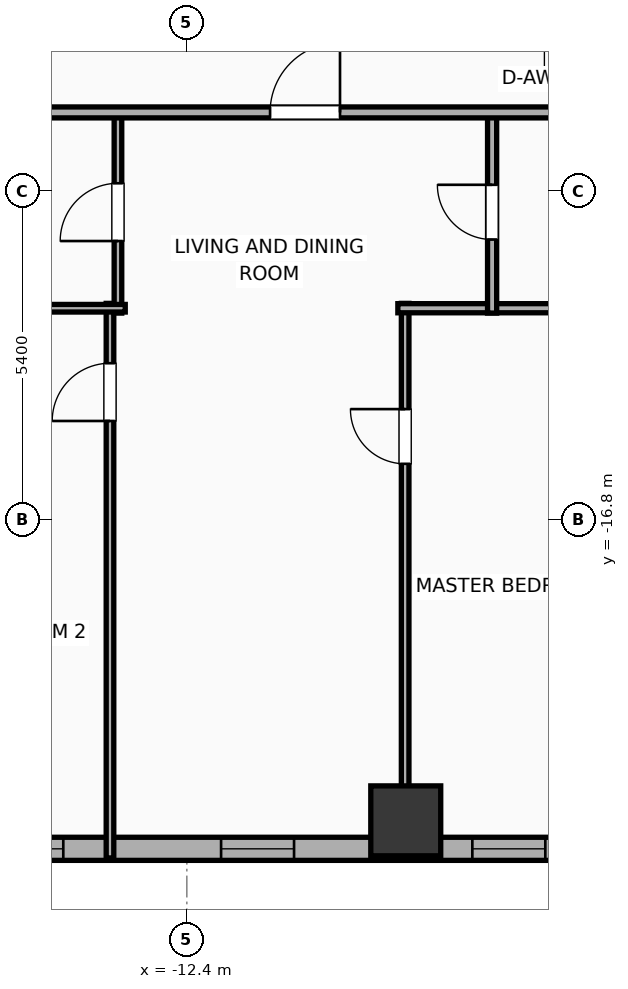
"""IFC4 building model, lengths in metres.
Left out: names, types, materials, properties, quantities, classifications, styles, units other than length and angle.
Written with IfcOpenShell. Run it as: python <this file> out.ifc"""

import sys

from ifc_helpers import new_model, si_unit, direction, frame, frame_2d, origin, origin_2d, place, context, subcontext, project, spatial, rectangle, hollow_rectangle, extrude, element, fill, save


model = new_model("IFC4")
c1 = context("Model", 3, precision=1e-05, world=origin(), true_north=direction((0.0, 1.0)))
c2 = subcontext(c1, "Body", "Model", "MODEL_VIEW")
j1 = project(units=[si_unit("LENGTHUNIT", "METRE"), si_unit("PLANEANGLEUNIT", "RADIAN")], contexts=[c1])
p1 = place(None, origin())
s1 = spatial("IfcSite", under=j1, at=p1, CompositionType="ELEMENT")
p2 = place(p1, origin())
s2 = spatial("IfcBuilding", under=s1, at=p2, CompositionType="ELEMENT")
p3 = place(p2, frame((0.0, 0.0, 41.6)))
s3 = spatial("IfcBuildingStorey", under=s2, at=p3, CompositionType="ELEMENT", Elevation=41.6)
p4 = place(p3, frame((-8.8, -21.75, 0.0), z_axis=(0.0, 0.0, 1.0), x_axis=(1.0, 0.0, 0.0)))
e1 = element("IfcColumn", 1, at=p4, inside=s3, PredefinedType="COLUMN", context=c2, shape_type="SweptSolid", body=[
    extrude(hollow_rectangle(XDim=1.15, YDim=1.15, WallThickness=0.04, at=origin_2d()), origin(), (0.0, 0.0, 1.0), 3.9),
])
p5 = place(p3, frame((22.381, -22.21, 0.0), z_axis=(0.0, 0.0, 1.0), x_axis=(-1.0, 0.0, 0.0)))
e2 = element("IfcWall", 2, at=p5, inside=s3, PredefinedType="ELEMENTEDWALL", context=c2, shape_type="SweptSolid", body=[
    extrude(rectangle(XDim=51.963, YDim=0.38, at=frame_2d((25.981, 0.0))), origin(), (0.0, 0.0, 1.0), 3.65),
])
p6 = place(p5, frame((42.952, 0.0, 0.75)))
e3 = element("IfcOpeningElement", 3, at=p6, cuts=e2, PredefinedType="OPENING", context=c2, shape_type="SweptSolid", body=[
    extrude(rectangle(XDim=2.4, YDim=2.1, at=frame_2d((1.2, 1.05))), frame((0.0, 0.2, 0.0), z_axis=(0.0, -1.0, 0.0), x_axis=(1.0, 0.0, 0.0)), (0.0, 0.0, 1.0), 0.4),
])
p7 = place(p5, frame((49.847, 0.0, 0.75)))
e4 = element("IfcOpeningElement", 4, at=p7, cuts=e2, PredefinedType="OPENING", context=c2, shape_type="SweptSolid", body=[
    extrude(rectangle(XDim=1.2, YDim=2.05, at=frame_2d((0.6, 1.025))), frame((0.0, 0.2, 0.0), z_axis=(0.0, -1.0, 0.0), x_axis=(1.0, 0.0, 0.0)), (0.0, 0.0, 1.0), 0.4),
])
p8 = place(p5, frame((47.445, 0.0, 0.75)))
e5 = element("IfcOpeningElement", 5, at=p8, cuts=e2, PredefinedType="OPENING", context=c2, shape_type="SweptSolid", body=[
    extrude(rectangle(XDim=1.2, YDim=2.05, at=frame_2d((0.6, 1.025))), frame((0.0, 0.2, 0.0), z_axis=(0.0, -1.0, 0.0), x_axis=(1.0, 0.0, 0.0)), (0.0, 0.0, 1.0), 0.4),
])
p9 = place(p5, frame((39.526, 0.0, 0.75)))
e6 = element("IfcOpeningElement", 6, at=p9, cuts=e2, PredefinedType="OPENING", context=c2, shape_type="SweptSolid", body=[
    extrude(rectangle(XDim=1.2, YDim=2.05, at=frame_2d((0.6, 1.025))), frame((0.0, 0.2, 0.0), z_axis=(0.0, -1.0, 0.0), x_axis=(1.0, 0.0, 0.0)), (0.0, 0.0, 1.0), 0.4),
])
p10 = place(p5, frame((33.018, 0.0, 0.75)))
e7 = element("IfcOpeningElement", 7, at=p10, cuts=e2, PredefinedType="OPENING", context=c2, shape_type="SweptSolid", body=[
    extrude(rectangle(XDim=1.2, YDim=2.05, at=frame_2d((0.6, 1.025))), frame((0.0, 0.2, 0.0), z_axis=(0.0, -1.0, 0.0), x_axis=(1.0, 0.0, 0.0)), (0.0, 0.0, 1.0), 0.4),
])
p11 = place(p5, frame((36.813, 0.0, 0.75)))
e8 = element("IfcOpeningElement", 8, at=p11, cuts=e2, PredefinedType="OPENING", context=c2, shape_type="SweptSolid", body=[
    extrude(rectangle(XDim=1.2, YDim=2.05, at=frame_2d((0.6, 1.025))), frame((0.0, 0.2, 0.0), z_axis=(0.0, -1.0, 0.0), x_axis=(1.0, 0.0, 0.0)), (0.0, 0.0, 1.0), 0.4),
])
p12 = place(p5, frame((28.886, 0.0, 0.75)))
e9 = element("IfcOpeningElement", 9, at=p12, cuts=e2, PredefinedType="OPENING", context=c2, shape_type="SweptSolid", body=[
    extrude(rectangle(XDim=1.2, YDim=2.05, at=frame_2d((0.6, 1.025))), frame((0.0, 0.2, 0.0), z_axis=(0.0, -1.0, 0.0), x_axis=(1.0, 0.0, 0.0)), (0.0, 0.0, 1.0), 0.4),
])
p13 = place(p5, frame((23.306, 0.0, 0.75)))
e10 = element("IfcOpeningElement", 10, at=p13, cuts=e2, PredefinedType="OPENING", context=c2, shape_type="SweptSolid", body=[
    extrude(rectangle(XDim=1.2, YDim=2.05, at=frame_2d((0.6, 1.025))), frame((0.0, 0.2, 0.0), z_axis=(0.0, -1.0, 0.0), x_axis=(1.0, 0.0, 0.0)), (0.0, 0.0, 1.0), 0.4),
])
p14 = place(p5, frame((26.056, 0.0, 0.75)))
e11 = element("IfcOpeningElement", 11, at=p14, cuts=e2, PredefinedType="OPENING", context=c2, shape_type="SweptSolid", body=[
    extrude(rectangle(XDim=1.2, YDim=2.05, at=frame_2d((0.6, 1.025))), frame((0.0, 0.2, 0.0), z_axis=(0.0, -1.0, 0.0), x_axis=(1.0, 0.0, 0.0)), (0.0, 0.0, 1.0), 0.4),
])
p15 = place(p5, frame((18.811, 0.0, 0.75)))
e12 = element("IfcOpeningElement", 12, at=p15, cuts=e2, PredefinedType="OPENING", context=c2, shape_type="SweptSolid", body=[
    extrude(rectangle(XDim=1.2, YDim=2.05, at=frame_2d((0.6, 1.025))), frame((0.0, 0.2, 0.0), z_axis=(0.0, -1.0, 0.0), x_axis=(1.0, 0.0, 0.0)), (0.0, 0.0, 1.0), 0.4),
])
p16 = place(p5, frame((14.602, 0.0, 0.75)))
e13 = element("IfcOpeningElement", 13, at=p16, cuts=e2, PredefinedType="OPENING", context=c2, shape_type="SweptSolid", body=[
    extrude(rectangle(XDim=1.2, YDim=2.05, at=frame_2d((0.6, 1.025))), frame((0.0, 0.2, 0.0), z_axis=(0.0, -1.0, 0.0), x_axis=(1.0, 0.0, 0.0)), (0.0, 0.0, 1.0), 0.4),
])
p17 = place(p5, frame((11.852, 0.0, 0.75)))
e14 = element("IfcOpeningElement", 14, at=p17, cuts=e2, PredefinedType="OPENING", context=c2, shape_type="SweptSolid", body=[
    extrude(rectangle(XDim=1.2, YDim=2.05, at=frame_2d((0.6, 1.025))), frame((0.0, 0.2, 0.0), z_axis=(0.0, -1.0, 0.0), x_axis=(1.0, 0.0, 0.0)), (0.0, 0.0, 1.0), 0.4),
])
p18 = place(p5, frame((8.316, 0.0, 0.75)))
e15 = element("IfcOpeningElement", 15, at=p18, cuts=e2, PredefinedType="OPENING", context=c2, shape_type="SweptSolid", body=[
    extrude(rectangle(XDim=1.2, YDim=2.05, at=frame_2d((0.6, 1.025))), frame((0.0, 0.2, 0.0), z_axis=(0.0, -1.0, 0.0), x_axis=(1.0, 0.0, 0.0)), (0.0, 0.0, 1.0), 0.4),
])
p19 = place(p5, frame((6.286, 0.0, 0.75)))
e16 = element("IfcOpeningElement", 16, at=p19, cuts=e2, PredefinedType="OPENING", context=c2, shape_type="SweptSolid", body=[
    extrude(rectangle(XDim=1.2, YDim=2.05, at=frame_2d((0.6, 1.025))), frame((0.0, 0.2, 0.0), z_axis=(0.0, -1.0, 0.0), x_axis=(1.0, 0.0, 0.0)), (0.0, 0.0, 1.0), 0.4),
])
p20 = place(p5, frame((3.737, 0.0, 0.75)))
e17 = element("IfcOpeningElement", 17, at=p20, cuts=e2, PredefinedType="OPENING", context=c2, shape_type="SweptSolid", body=[
    extrude(rectangle(XDim=1.2, YDim=2.05, at=frame_2d((0.6, 1.025))), frame((0.0, 0.2, 0.0), z_axis=(0.0, -1.0, 0.0), x_axis=(1.0, 0.0, 0.0)), (0.0, 0.0, 1.0), 0.4),
])
p21 = place(p5, frame((1.291, 0.0, 0.75)))
e18 = element("IfcOpeningElement", 18, at=p21, cuts=e2, PredefinedType="OPENING", context=c2, shape_type="SweptSolid", body=[
    extrude(rectangle(XDim=1.2, YDim=2.05, at=frame_2d((0.6, 1.025))), frame((0.0, 0.2, 0.0), z_axis=(0.0, -1.0, 0.0), x_axis=(1.0, 0.0, 0.0)), (0.0, 0.0, 1.0), 0.4),
])
p22 = place(p3, frame((-13.664, -22.36, 0.0), z_axis=(0.0, 0.0, 1.0), x_axis=(0.0, 1.0, 0.0)))
e19 = element("IfcWall", 19, at=p22, inside=s3, PredefinedType="PARTITIONING", context=c2, shape_type="SweptSolid", body=[
    extrude(rectangle(XDim=9.12, YDim=0.125, at=frame_2d((4.56, 0.0))), origin(), (0.0, 0.0, 1.0), 3.65),
])
p23 = place(p22, frame((7.186, 0.0, 0.0)))
e20 = element("IfcOpeningElement", 20, at=p23, cuts=e19, PredefinedType="OPENING", context=c2, shape_type="SweptSolid", body=[
    extrude(rectangle(XDim=0.95, YDim=2.05, at=frame_2d((0.475, 1.025))), frame((0.0, 0.073, 0.0), z_axis=(0.0, -1.0, 0.0), x_axis=(1.0, 0.0, 0.0)), (0.0, 0.0, 1.0), 0.145),
])
p24 = place(p3, frame((-8.81, -22.36, 0.0), z_axis=(0.0, 0.0, 1.0), x_axis=(0.0, 1.0, 0.0)))
e21 = element("IfcWall", 21, at=p24, inside=s3, PredefinedType="PARTITIONING", context=c2, shape_type="SweptSolid", body=[
    extrude(rectangle(XDim=9.12, YDim=0.125, at=frame_2d((4.56, 0.0))), origin(), (0.0, 0.0, 1.0), 2.94),
])
p25 = place(p24, frame((6.481, 0.0, 0.0)))
e22 = element("IfcOpeningElement", 22, at=p25, cuts=e21, PredefinedType="OPENING", context=c2, shape_type="SweptSolid", body=[
    extrude(rectangle(XDim=0.9, YDim=2.05, at=frame_2d((0.45, 1.025))), frame((0.0, 0.073, 0.0), z_axis=(0.0, -1.0, 0.0), x_axis=(1.0, 0.0, 0.0)), (0.0, 0.0, 1.0), 0.145),
])
p26 = place(p3, frame((-8.93, -13.32, 0.0), z_axis=(0.0, 0.0, 1.0), x_axis=(1.0, 0.0, 0.0)))
e23 = element("IfcWall", 23, at=p26, inside=s3, PredefinedType="PLUMBINGWALL", context=c2, shape_type="SweptSolid", body=[
    extrude(rectangle(XDim=3.79, YDim=0.15, at=frame_2d((1.895, 0.0))), origin(), (0.0, 0.0, 1.0), 3.65),
])
p27 = place(p3, frame((-13.533, -13.4, 0.0), z_axis=(0.0, 0.0, 1.0), x_axis=(0.0, 1.0, 0.0)))
e24 = element("IfcWall", 24, at=p27, inside=s3, PredefinedType="PARTITIONING", context=c2, shape_type="SweptSolid", body=[
    extrude(rectangle(XDim=3.32, YDim=0.125, at=frame_2d((1.66, 0.0))), origin(), (0.0, 0.0, 1.0), 3.65),
])
p28 = place(p27, frame((1.185, 0.0, 0.0)))
e25 = element("IfcOpeningElement", 25, at=p28, cuts=e24, PredefinedType="OPENING", context=c2, shape_type="SweptSolid", body=[
    extrude(rectangle(XDim=0.95, YDim=2.05, at=frame_2d((0.475, 1.025))), frame((0.0, 0.073, 0.0), z_axis=(0.0, -1.0, 0.0), x_axis=(1.0, 0.0, 0.0)), (0.0, 0.0, 1.0), 0.145),
])
p29 = place(p3, frame((-16.475, -13.32, 0.0), z_axis=(0.0, 0.0, 1.0), x_axis=(1.0, 0.0, 0.0)))
e26 = element("IfcWall", 26, at=p29, inside=s3, PredefinedType="PARTITIONING", context=c2, shape_type="SweptSolid", body=[
    extrude(rectangle(XDim=3.062, YDim=0.125, at=frame_2d((1.531, 0.0))), origin(), (0.0, 0.0, 1.0), 3.65),
])
p30 = place(p3, frame((-7.38, -13.4, 0.0), z_axis=(0.0, 0.0, 1.0), x_axis=(0.0, 1.0, 0.0)))
e27 = element("IfcWall", 27, at=p30, inside=s3, PredefinedType="PLUMBINGWALL", context=c2, shape_type="SweptSolid", body=[
    extrude(rectangle(XDim=3.32, YDim=0.15, at=frame_2d((1.66, 0.0))), origin(), (0.0, 0.0, 1.0), 3.65),
])
p31 = place(p30, frame((1.21, 0.0, 0.0)))
e28 = element("IfcOpeningElement", 28, at=p31, cuts=e27, PredefinedType="OPENING", context=c2, shape_type="SweptSolid", body=[
    extrude(rectangle(XDim=0.9, YDim=2.05, at=frame_2d((0.45, 1.025))), frame((0.0, 0.085, 0.0), z_axis=(0.0, -1.0, 0.0), x_axis=(1.0, 0.0, 0.0)), (0.0, 0.0, 1.0), 0.17),
])
p32 = place(p3, frame((-33.41, -10.1, 0.0), z_axis=(0.0, 0.0, 1.0), x_axis=(1.0, 0.0, 0.0)))
e29 = element("IfcWall", 29, at=p32, inside=s3, PredefinedType="PARTITIONING", context=c2, shape_type="SweptSolid", body=[
    extrude(rectangle(XDim=59.62, YDim=0.18, at=frame_2d((29.81, 0.0))), origin(), (0.0, 0.0, 1.0), 3.65),
])
p33 = place(p32, frame((2.746, 0.0, 0.0)))
e30 = element("IfcOpeningElement", 30, at=p33, cuts=e29, PredefinedType="OPENING", context=c2, shape_type="SweptSolid", body=[
    extrude(rectangle(XDim=0.9, YDim=2.05, at=frame_2d((0.45, 1.025))), frame((0.0, 0.1, 0.0), z_axis=(0.0, -1.0, 0.0), x_axis=(1.0, 0.0, 0.0)), (0.0, 0.0, 1.0), 0.2),
])
p34 = place(p32, frame((11.552, 0.0, 0.0)))
e31 = element("IfcOpeningElement", 31, at=p34, cuts=e29, PredefinedType="OPENING", context=c2, shape_type="SweptSolid", body=[
    extrude(rectangle(XDim=1.15, YDim=2.05, at=frame_2d((0.575, 1.025))), frame((0.0, 0.1, 0.0), z_axis=(0.0, -1.0, 0.0), x_axis=(1.0, 0.0, 0.0)), (0.0, 0.0, 1.0), 0.2),
])
p35 = place(p32, frame((22.379, 0.0, 0.0)))
e32 = element("IfcOpeningElement", 32, at=p35, cuts=e29, PredefinedType="OPENING", context=c2, shape_type="SweptSolid", body=[
    extrude(rectangle(XDim=1.15, YDim=2.05, at=frame_2d((0.575, 1.025))), frame((0.0, 0.1, 0.0), z_axis=(0.0, -1.0, 0.0), x_axis=(1.0, 0.0, 0.0)), (0.0, 0.0, 1.0), 0.2),
])
p36 = place(p32, frame((31.28, 0.0, 0.0)))
e33 = element("IfcOpeningElement", 33, at=p36, cuts=e29, PredefinedType="OPENING", context=c2, shape_type="SweptSolid", body=[
    extrude(rectangle(XDim=1.15, YDim=2.05, at=frame_2d((0.575, 1.025))), frame((0.0, 0.1, 0.0), z_axis=(0.0, -1.0, 0.0), x_axis=(1.0, 0.0, 0.0)), (0.0, 0.0, 1.0), 0.2),
])
p37 = place(p32, frame((36.02, 0.0, 0.0)))
e34 = element("IfcOpeningElement", 34, at=p37, cuts=e29, PredefinedType="OPENING", context=c2, shape_type="SweptSolid", body=[
    extrude(rectangle(XDim=0.9, YDim=2.05, at=frame_2d((0.45, 1.025))), frame((0.0, 0.1, 0.0), z_axis=(0.0, -1.0, 0.0), x_axis=(1.0, 0.0, 0.0)), (0.0, 0.0, 1.0), 0.2),
])
p38 = place(p32, frame((40.044, 0.0, 0.0)))
e35 = element("IfcOpeningElement", 35, at=p38, cuts=e29, PredefinedType="OPENING", context=c2, shape_type="SweptSolid", body=[
    extrude(rectangle(XDim=1.15, YDim=2.05, at=frame_2d((0.575, 1.025))), frame((0.0, 0.1, 0.0), z_axis=(0.0, -1.0, 0.0), x_axis=(1.0, 0.0, 0.0)), (0.0, 0.0, 1.0), 0.2),
])
p39 = place(p32, frame((45.613, 0.0, 0.0)))
e36 = element("IfcOpeningElement", 36, at=p39, cuts=e29, PredefinedType="OPENING", context=c2, shape_type="SweptSolid", body=[
    extrude(rectangle(XDim=1.15, YDim=2.05, at=frame_2d((0.575, 1.025))), frame((0.0, 0.1, 0.0), z_axis=(0.0, -1.0, 0.0), x_axis=(1.0, 0.0, 0.0)), (0.0, 0.0, 1.0), 0.2),
])
p40 = place(p32, frame((54.174, 0.0, 0.0)))
e37 = element("IfcOpeningElement", 37, at=p40, cuts=e29, PredefinedType="OPENING", context=c2, shape_type="SweptSolid", body=[
    extrude(rectangle(XDim=1.15, YDim=2.05, at=frame_2d((0.575, 1.025))), frame((0.0, 0.1, 0.0), z_axis=(0.0, -1.0, 0.0), x_axis=(1.0, 0.0, 0.0)), (0.0, 0.0, 1.0), 0.2),
])
p41 = place(p10, origin())
e38 = element("IfcWindow", 38, at=p41, inside=s3, PartitioningType="SINGLE_PANEL", PredefinedType="WINDOW", context=c2, shape_type="SweptSolid", body=[
    extrude(rectangle(XDim=1.2, YDim=2.05, at=frame_2d((0.6, 1.025))), frame((0.0, 0.03, 0.0), z_axis=(0.0, -1.0, 0.0), x_axis=(1.0, 0.0, 0.0)), (0.0, 0.0, 1.0), 0.06),
])
fill(e7, e38)
p42 = place(p11, origin())
e39 = element("IfcWindow", 39, at=p42, inside=s3, PartitioningType="SINGLE_PANEL", PredefinedType="WINDOW", context=c2, shape_type="SweptSolid", body=[
    extrude(rectangle(XDim=1.2, YDim=2.05, at=frame_2d((0.6, 1.025))), frame((0.0, 0.03, 0.0), z_axis=(0.0, -1.0, 0.0), x_axis=(1.0, 0.0, 0.0)), (0.0, 0.0, 1.0), 0.06),
])
fill(e8, e39)
p43 = place(p12, origin())
e40 = element("IfcWindow", 40, at=p43, inside=s3, PartitioningType="SINGLE_PANEL", PredefinedType="WINDOW", context=c2, shape_type="SweptSolid", body=[
    extrude(rectangle(XDim=1.2, YDim=2.05, at=frame_2d((0.6, 1.025))), frame((0.0, 0.03, 0.0), z_axis=(0.0, -1.0, 0.0), x_axis=(1.0, 0.0, 0.0)), (0.0, 0.0, 1.0), 0.06),
])
fill(e9, e40)
p44 = place(p23, origin())
e41 = element("IfcDoor", 41, at=p44, inside=s3, OperationType="SINGLE_SWING_LEFT", PredefinedType="DOOR", context=c2, shape_type="SweptSolid", body=[
    extrude(rectangle(XDim=0.95, YDim=2.05, at=frame_2d((0.475, 1.025))), frame((0.0, 0.025, 0.0), z_axis=(0.0, -1.0, 0.0), x_axis=(1.0, 0.0, 0.0)), (0.0, 0.0, 1.0), 0.05),
])
fill(e20, e41)
p45 = place(p25, origin())
e42 = element("IfcDoor", 42, at=p45, inside=s3, OperationType="SINGLE_SWING_RIGHT", PredefinedType="DOOR", context=c2, shape_type="SweptSolid", body=[
    extrude(rectangle(XDim=0.9, YDim=2.05, at=frame_2d((0.45, 1.025))), frame((0.0, 0.025, 0.0), z_axis=(0.0, -1.0, 0.0), x_axis=(1.0, 0.0, 0.0)), (0.0, 0.0, 1.0), 0.05),
])
fill(e22, e42)
p46 = place(p28, origin())
e43 = element("IfcDoor", 43, at=p46, inside=s3, OperationType="SINGLE_SWING_LEFT", PredefinedType="DOOR", context=c2, shape_type="SweptSolid", body=[
    extrude(rectangle(XDim=0.95, YDim=2.05, at=frame_2d((0.475, 1.025))), frame((0.0, 0.025, 0.0), z_axis=(0.0, -1.0, 0.0), x_axis=(1.0, 0.0, 0.0)), (0.0, 0.0, 1.0), 0.05),
])
fill(e25, e43)
p47 = place(p31, origin())
e44 = element("IfcDoor", 44, at=p47, inside=s3, OperationType="SINGLE_SWING_RIGHT", PredefinedType="DOOR", context=c2, shape_type="SweptSolid", body=[
    extrude(rectangle(XDim=0.9, YDim=2.05, at=frame_2d((0.45, 1.025))), frame((0.0, 0.025, 0.0), z_axis=(0.0, -1.0, 0.0), x_axis=(1.0, 0.0, 0.0)), (0.0, 0.0, 1.0), 0.05),
])
fill(e28, e44)
p48 = place(p35, origin())
e45 = element("IfcDoor", 45, at=p48, inside=s3, OperationType="SINGLE_SWING_RIGHT", PredefinedType="DOOR", context=c2, shape_type="SweptSolid", body=[
    extrude(rectangle(XDim=1.15, YDim=2.05, at=frame_2d((0.575, 1.025))), frame((0.0, 0.025, 0.0), z_axis=(0.0, -1.0, 0.0), x_axis=(1.0, 0.0, 0.0)), (0.0, 0.0, 1.0), 0.05),
])
fill(e32, e45)
save(model, sys.argv[1])
